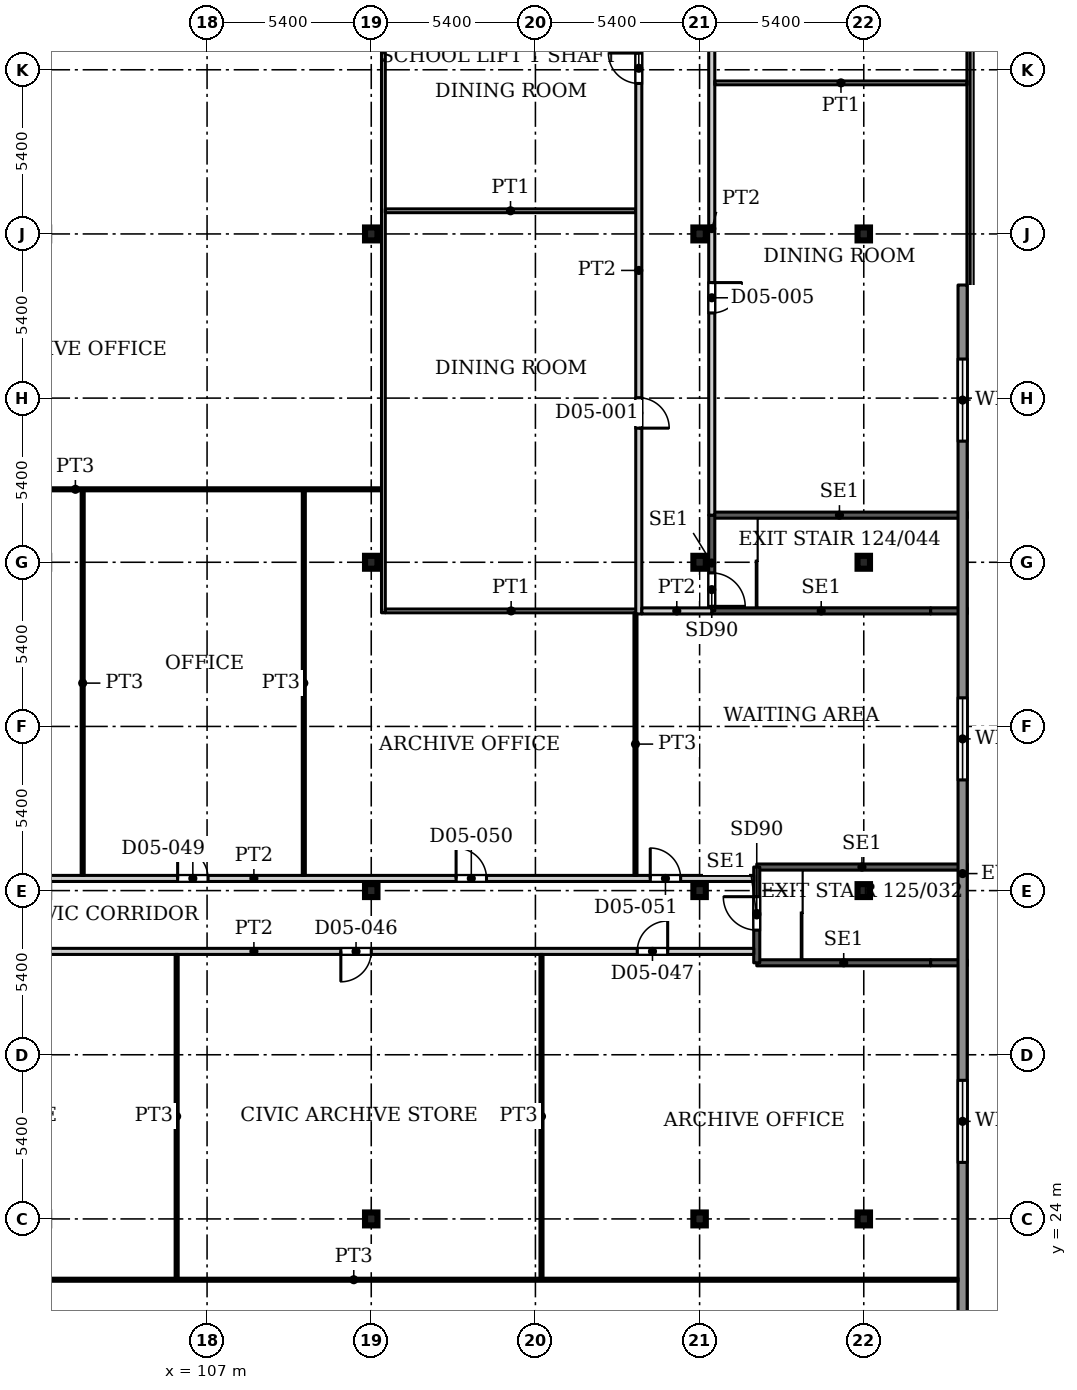
"""IFC4 building model, lengths in metres.
Left out: names, types, materials, properties, quantities, classifications, styles, units other than length and angle.
Written with IfcOpenShell. Run it as: python <this file> out.ifc"""

import sys

from ifc_helpers import new_model, si_unit, direction, frame, frame_2d, origin, origin_2d, place, context, subcontext, project, spatial, rectangle, i_section, extrude, source, transform, mapped, element, fill, save


model = new_model("IFC4")
c1 = context("Model", 3, precision=1e-05, world=origin(), true_north=direction((0.0, 1.0)))
c2 = subcontext(c1, "Body", "Model", "MODEL_VIEW")
j1 = project(units=[si_unit("LENGTHUNIT", "METRE"), si_unit("PLANEANGLEUNIT", "RADIAN")], contexts=[c1])
p1 = place(None, origin())
s1 = spatial("IfcSite", under=j1, at=p1, CompositionType="ELEMENT")
p2 = place(p1, origin())
s2 = spatial("IfcBuilding", under=s1, at=p2, CompositionType="ELEMENT")
p3 = place(p2, frame((0.0, 0.0, 26.0)))
s3 = spatial("IfcBuildingStorey", under=s2, at=p3, CompositionType="ELEMENT", Elevation=26.0)
for number, where, z_axis, x_axis in (
    (1, (112.4, 24.0, 0.0), (0.0, 0.0, 1.0), (1.0, 0.0, 0.0)),
    (2, (123.2, 24.0, 0.0), (0.0, 0.0, 1.0), (1.0, 0.0, 0.0)),
    (3, (128.6, 24.0, 0.0), (0.0, 0.0, 1.0), (1.0, 0.0, 0.0)),
    (4, (112.4, 34.8, 0.0), (0.0, 0.0, 1.0), (1.0, 0.0, 0.0)),
    (5, (123.2, 34.8, 0.0), (0.0, 0.0, 1.0), (1.0, 0.0, 0.0)),
    (6, (128.6, 34.8, 0.0), (0.0, 0.0, 1.0), (1.0, 0.0, 0.0)),
    (7, (112.4, 45.6, 0.0), (0.0, 0.0, 1.0), (1.0, 0.0, 0.0)),
    (8, (123.2, 45.6, 0.0), (0.0, 0.0, 1.0), (1.0, 0.0, 0.0)),
    (9, (128.6, 45.6, 0.0), (0.0, 0.0, 1.0), (1.0, 0.0, 0.0)),
    (10, (112.4, 56.4, 0.0), (0.0, 0.0, 1.0), (1.0, 0.0, 0.0)),
    (11, (123.2, 56.4, 0.0), (0.0, 0.0, 1.0), (1.0, 0.0, 0.0)),
    (12, (128.6, 56.4, 0.0), (0.0, 0.0, 1.0), (1.0, 0.0, 0.0)),
):
    element("IfcColumn", number, at=place(p3, frame(where, z_axis=z_axis, x_axis=x_axis)), inside=s3, PredefinedType="COLUMN", context=c2, shape_type="SweptSolid", body=[
        extrude(i_section(OverallWidth=0.409, OverallDepth=0.425, WebThickness=0.033, FlangeThickness=0.052, FilletRadius=0.013, at=origin_2d()), origin(), (0.0, 0.0, 1.0), 4.5),
    ])
p4 = place(p3, frame((131.85, 54.72, 0.0), z_axis=(0.0, 0.0, 1.0), x_axis=(0.0, -1.0, 0.0)))
e13 = element("IfcWall", 13, at=p4, inside=s3, PredefinedType="SOLIDWALL", context=c2, shape_type="SweptSolid", body=[
    extrude(rectangle(XDim=38.72, YDim=0.3, at=frame_2d((19.36, 0.0))), origin(), (0.0, 0.0, 1.0), 4.25),
])
p5 = place(p4, frame((2.435, 0.0, 2.4)))
e14 = element("IfcOpeningElement", 14, at=p5, cuts=e13, PredefinedType="OPENING", context=c2, shape_type="SweptSolid", body=[
    extrude(rectangle(XDim=2.7, YDim=1.2, at=frame_2d((1.35, 0.6))), frame((0.0, 0.16, 0.0), z_axis=(0.0, -1.0, 0.0), x_axis=(1.0, 0.0, 0.0)), (0.0, 0.0, 1.0), 0.32),
])
p6 = place(p4, frame((13.58, 0.0, 2.4)))
e15 = element("IfcOpeningElement", 15, at=p6, cuts=e13, PredefinedType="OPENING", context=c2, shape_type="SweptSolid", body=[
    extrude(rectangle(XDim=2.7, YDim=1.2, at=frame_2d((1.35, 0.6))), frame((0.0, 0.16, 0.0), z_axis=(0.0, -1.0, 0.0), x_axis=(1.0, 0.0, 0.0)), (0.0, 0.0, 1.0), 0.32),
])
p7 = place(p4, frame((26.16, 0.0, 2.4)))
e16 = element("IfcOpeningElement", 16, at=p7, cuts=e13, PredefinedType="OPENING", context=c2, shape_type="SweptSolid", body=[
    extrude(rectangle(XDim=2.7, YDim=1.2, at=frame_2d((1.35, 0.6))), frame((0.0, 0.16, 0.0), z_axis=(0.0, -1.0, 0.0), x_axis=(1.0, 0.0, 0.0)), (0.0, 0.0, 1.0), 0.32),
])
p8 = place(p3, frame((123.6, 44.0, 0.0), z_axis=(0.0, 0.0, 1.0), x_axis=(1.0, 0.0, 0.0)))
e17 = element("IfcWall", 17, at=p8, inside=s3, PredefinedType="SHEAR", context=c2, shape_type="SweptSolid", body=[
    extrude(rectangle(XDim=7.2, YDim=0.2, at=frame_2d((3.6, 0.0))), origin(), (0.0, 0.0, 1.0), 4.5),
])
p9 = place(p3, frame((130.8, 44.0, 0.0), z_axis=(0.0, 0.0, 1.0), x_axis=(1.0, 0.0, 0.0)))
e18 = element("IfcWall", 18, at=p9, inside=s3, PredefinedType="SHEAR", context=c2, shape_type="SweptSolid", body=[
    extrude(rectangle(XDim=1.2, YDim=0.2, at=frame_2d((0.6, 0.0))), origin(), (0.0, 0.0, 1.0), 4.5),
])
p10 = place(p3, frame((123.6, 47.15, 0.0), z_axis=(0.0, 0.0, 1.0), x_axis=(1.0, 0.0, 0.0)))
e19 = element("IfcWall", 19, at=p10, inside=s3, PredefinedType="SHEAR", context=c2, shape_type="SweptSolid", body=[
    extrude(rectangle(XDim=8.4, YDim=0.2, at=frame_2d((4.2, 0.0))), origin(), (0.0, 0.0, 1.0), 4.5),
])
p11 = place(p3, frame((123.6, 44.0, 0.0), z_axis=(0.0, 0.0, 1.0), x_axis=(0.0, 1.0, 0.0)))
e20 = element("IfcWall", 20, at=p11, inside=s3, PredefinedType="SHEAR", context=c2, shape_type="SweptSolid", body=[
    extrude(rectangle(XDim=3.15, YDim=0.2, at=frame_2d((1.575, 0.0))), origin(), (0.0, 0.0, 1.0), 4.5),
])
p12 = place(p11, frame((0.15, 0.0, 0.0)))
e21 = element("IfcOpeningElement", 21, at=p12, cuts=e20, PredefinedType="OPENING", context=c2, shape_type="SweptSolid", body=[
    extrude(rectangle(XDim=1.1, YDim=2.2, at=frame_2d((0.55, 1.1))), frame((0.0, 0.11, 0.0), z_axis=(0.0, -1.0, 0.0), x_axis=(1.0, 0.0, 0.0)), (0.0, 0.0, 1.0), 0.22),
])
p13 = place(p3, frame((125.08, 32.425, 0.0), z_axis=(0.0, 0.0, 1.0), x_axis=(1.0, 0.0, 0.0)))
e22 = element("IfcWall", 22, at=p13, inside=s3, PredefinedType="SHEAR", context=c2, shape_type="SweptSolid", body=[
    extrude(rectangle(XDim=5.72, YDim=0.2, at=frame_2d((2.86, 0.0))), origin(), (0.0, 0.0, 1.0), 4.5),
])
p14 = place(p3, frame((130.8, 32.425, 0.0), z_axis=(0.0, 0.0, 1.0), x_axis=(1.0, 0.0, 0.0)))
e23 = element("IfcWall", 23, at=p14, inside=s3, PredefinedType="SHEAR", context=c2, shape_type="SweptSolid", body=[
    extrude(rectangle(XDim=1.2, YDim=0.2, at=frame_2d((0.6, 0.0))), origin(), (0.0, 0.0, 1.0), 4.5),
])
p15 = place(p3, frame((125.08, 35.575, 0.0), z_axis=(0.0, 0.0, 1.0), x_axis=(1.0, 0.0, 0.0)))
e24 = element("IfcWall", 24, at=p15, inside=s3, PredefinedType="SHEAR", context=c2, shape_type="SweptSolid", body=[
    extrude(rectangle(XDim=6.92, YDim=0.2, at=frame_2d((3.46, 0.0))), origin(), (0.0, 0.0, 1.0), 4.5),
])
p16 = place(p3, frame((125.08, 32.425, 0.0), z_axis=(0.0, 0.0, 1.0), x_axis=(0.0, 1.0, 0.0)))
e25 = element("IfcWall", 25, at=p16, inside=s3, PredefinedType="SHEAR", context=c2, shape_type="SweptSolid", body=[
    extrude(rectangle(XDim=3.15, YDim=0.2, at=frame_2d((1.575, 0.0))), origin(), (0.0, 0.0, 1.0), 4.5),
])
p17 = place(p16, frame((1.075, 0.0, 0.0)))
e26 = element("IfcOpeningElement", 26, at=p17, cuts=e25, PredefinedType="OPENING", context=c2, shape_type="SweptSolid", body=[
    extrude(rectangle(XDim=1.1, YDim=2.2, at=frame_2d((0.55, 1.1))), frame((0.0, 0.11, 0.0), z_axis=(0.0, -1.0, 0.0), x_axis=(1.0, 0.0, 0.0)), (0.0, 0.0, 1.0), 0.22),
])
p18 = place(p3, frame((91.95, 22.0, 0.0), z_axis=(0.0, 0.0, 1.0), x_axis=(1.0, 0.0, 0.0)))
e27 = element("IfcWall", 27, at=p18, inside=s3, PredefinedType="PARTITIONING", context=c2, shape_type="SweptSolid", body=[
    extrude(rectangle(XDim=39.751, YDim=0.1, at=frame_2d((19.875, 0.0))), origin(), (0.0, 0.0, 1.0), 4.2),
])
p19 = place(p3, frame((92.1, 32.8, 0.0), z_axis=(0.0, 0.0, 1.0), x_axis=(1.0, 0.0, 0.0)))
e28 = element("IfcWall", 28, at=p19, inside=s3, PredefinedType="PARTITIONING", context=c2, shape_type="SweptSolid", body=[
    extrude(rectangle(XDim=32.881, YDim=0.2, at=frame_2d((16.44, 0.0))), origin(), (0.0, 0.0, 1.0), 4.2),
])
p20 = place(p19, frame((6.3, 0.0, 0.0)))
e29 = element("IfcOpeningElement", 29, at=p20, cuts=e28, PredefinedType="OPENING", context=c2, shape_type="SweptSolid", body=[
    extrude(rectangle(XDim=1.0, YDim=2.1, at=frame_2d((0.5, 1.05))), frame((0.0, 0.11, 0.0), z_axis=(0.0, -1.0, 0.0), x_axis=(1.0, 0.0, 0.0)), (0.0, 0.0, 1.0), 0.22),
])
p21 = place(p19, frame((19.3, 0.0, 0.0)))
e30 = element("IfcOpeningElement", 30, at=p21, cuts=e28, PredefinedType="OPENING", context=c2, shape_type="SweptSolid", body=[
    extrude(rectangle(XDim=1.0, YDim=2.1, at=frame_2d((0.5, 1.05))), frame((0.0, 0.11, 0.0), z_axis=(0.0, -1.0, 0.0), x_axis=(1.0, 0.0, 0.0)), (0.0, 0.0, 1.0), 0.22),
])
p22 = place(p19, frame((29.05, 0.0, 0.0)))
e31 = element("IfcOpeningElement", 31, at=p22, cuts=e28, PredefinedType="OPENING", context=c2, shape_type="SweptSolid", body=[
    extrude(rectangle(XDim=1.0, YDim=2.1, at=frame_2d((0.5, 1.05))), frame((0.0, 0.11, 0.0), z_axis=(0.0, -1.0, 0.0), x_axis=(1.0, 0.0, 0.0)), (0.0, 0.0, 1.0), 0.22),
])
p23 = place(p3, frame((92.1, 35.2, 0.0), z_axis=(0.0, 0.0, 1.0), x_axis=(1.0, 0.0, 0.0)))
e32 = element("IfcWall", 32, at=p23, inside=s3, PredefinedType="PARTITIONING", context=c2, shape_type="SweptSolid", body=[
    extrude(rectangle(XDim=32.88, YDim=0.2, at=frame_2d((16.44, 0.0))), origin(), (0.0, 0.0, 1.0), 4.2),
])
p24 = place(p23, frame((4.909, 0.0, 0.0)))
e33 = element("IfcOpeningElement", 33, at=p24, cuts=e32, PredefinedType="OPENING", context=c2, shape_type="SweptSolid", body=[
    extrude(rectangle(XDim=1.0, YDim=2.1, at=frame_2d((0.5, 1.05))), frame((0.0, 0.11, 0.0), z_axis=(0.0, -1.0, 0.0), x_axis=(1.0, 0.0, 0.0)), (0.0, 0.0, 1.0), 0.22),
])
p25 = place(p23, frame((13.932, 0.0, 0.0)))
e34 = element("IfcOpeningElement", 34, at=p25, cuts=e32, PredefinedType="OPENING", context=c2, shape_type="SweptSolid", body=[
    extrude(rectangle(XDim=1.0, YDim=2.1, at=frame_2d((0.5, 1.05))), frame((0.0, 0.11, 0.0), z_axis=(0.0, -1.0, 0.0), x_axis=(1.0, 0.0, 0.0)), (0.0, 0.0, 1.0), 0.22),
])
p26 = place(p23, frame((23.091, 0.0, 0.0)))
e35 = element("IfcOpeningElement", 35, at=p26, cuts=e32, PredefinedType="OPENING", context=c2, shape_type="SweptSolid", body=[
    extrude(rectangle(XDim=1.0, YDim=2.1, at=frame_2d((0.5, 1.05))), frame((0.0, 0.11, 0.0), z_axis=(0.0, -1.0, 0.0), x_axis=(1.0, 0.0, 0.0)), (0.0, 0.0, 1.0), 0.22),
])
p27 = place(p23, frame((29.477, 0.0, 0.0)))
e36 = element("IfcOpeningElement", 36, at=p27, cuts=e32, PredefinedType="OPENING", context=c2, shape_type="SweptSolid", body=[
    extrude(rectangle(XDim=1.0, YDim=2.1, at=frame_2d((0.5, 1.05))), frame((0.0, 0.11, 0.0), z_axis=(0.0, -1.0, 0.0), x_axis=(1.0, 0.0, 0.0)), (0.0, 0.0, 1.0), 0.22),
])
p28 = place(p3, frame((92.6, 48.0, 0.0), z_axis=(0.0, 0.0, 1.0), x_axis=(1.0, 0.0, 0.0)))
e37 = element("IfcWall", 37, at=p28, inside=s3, PredefinedType="PARTITIONING", context=c2, shape_type="SweptSolid", body=[
    extrude(rectangle(XDim=20.138, YDim=0.1, at=frame_2d((10.069, 0.0))), origin(), (0.0, 0.0, 1.0), 4.2),
])
p29 = place(p3, frame((102.909, 35.3, 0.0), z_axis=(0.0, 0.0, 1.0), x_axis=(0.0, 1.0, 0.0)))
e38 = element("IfcWall", 38, at=p29, inside=s3, PredefinedType="PARTITIONING", context=c2, shape_type="SweptSolid", body=[
    extrude(rectangle(XDim=12.65, YDim=0.1, at=frame_2d((6.325, 0.0))), origin(), (0.0, 0.0, 1.0), 4.2),
])
p30 = place(p3, frame((106.0, 22.05, 0.0), z_axis=(0.0, 0.0, 1.0), x_axis=(0.0, 1.0, 0.0)))
e39 = element("IfcWall", 39, at=p30, inside=s3, PredefinedType="PARTITIONING", context=c2, shape_type="SweptSolid", body=[
    extrude(rectangle(XDim=10.65, YDim=0.1, at=frame_2d((5.325, 0.0))), origin(), (0.0, 0.0, 1.0), 4.2),
])
p31 = place(p3, frame((110.182, 35.3, 0.0), z_axis=(0.0, 0.0, 1.0), x_axis=(0.0, 1.0, 0.0)))
e40 = element("IfcWall", 40, at=p31, inside=s3, PredefinedType="PARTITIONING", context=c2, shape_type="SweptSolid", body=[
    extrude(rectangle(XDim=12.65, YDim=0.1, at=frame_2d((6.325, 0.0))), origin(), (0.0, 0.0, 1.0), 4.2),
])
p32 = place(p3, frame((112.8, 43.938, 0.0), z_axis=(0.0, 0.0, 1.0), x_axis=(0.0, 1.0, 0.0)))
e41 = element("IfcWall", 41, at=p32, inside=s3, PredefinedType="PARTITIONING", context=c2, shape_type="SweptSolid", body=[
    extrude(rectangle(XDim=46.787, YDim=0.125, at=frame_2d((23.394, 0.0))), origin(), (0.0, 0.0, 1.0), 4.2),
])
p33 = place(p3, frame((112.862, 44.0, 0.0), z_axis=(0.0, 0.0, 1.0), x_axis=(1.0, 0.0, 0.0)))
e42 = element("IfcWall", 42, at=p33, inside=s3, PredefinedType="PARTITIONING", context=c2, shape_type="SweptSolid", body=[
    extrude(rectangle(XDim=8.279, YDim=0.125, at=frame_2d((4.14, 0.0))), origin(), (0.0, 0.0, 1.0), 4.2),
])
p34 = place(p3, frame((112.862, 57.162, 0.0), z_axis=(0.0, 0.0, 1.0), x_axis=(1.0, 0.0, 0.0)))
e43 = element("IfcWall", 43, at=p34, inside=s3, PredefinedType="PARTITIONING", context=c2, shape_type="SweptSolid", body=[
    extrude(rectangle(XDim=8.238, YDim=0.125, at=frame_2d((4.119, 0.0))), origin(), (0.0, 0.0, 1.0), 4.2),
])
p35 = place(p3, frame((118.0, 22.05, 0.0), z_axis=(0.0, 0.0, 1.0), x_axis=(0.0, 1.0, 0.0)))
e44 = element("IfcWall", 44, at=p35, inside=s3, PredefinedType="PARTITIONING", context=c2, shape_type="SweptSolid", body=[
    extrude(rectangle(XDim=10.65, YDim=0.1, at=frame_2d((5.325, 0.0))), origin(), (0.0, 0.0, 1.0), 4.2),
])
p36 = place(p3, frame((121.091, 35.3, 0.0), z_axis=(0.0, 0.0, 1.0), x_axis=(0.0, 1.0, 0.0)))
e45 = element("IfcWall", 45, at=p36, inside=s3, PredefinedType="PARTITIONING", context=c2, shape_type="SweptSolid", body=[
    extrude(rectangle(XDim=8.638, YDim=0.1, at=frame_2d((4.319, 0.0))), origin(), (0.0, 0.0, 1.0), 4.2),
])
p37 = place(p3, frame((121.2, 43.9, 0.0), z_axis=(0.0, 0.0, 1.0), x_axis=(0.0, 1.0, 0.0)))
e46 = element("IfcWall", 46, at=p37, inside=s3, PredefinedType="PARTITIONING", context=c2, shape_type="SweptSolid", body=[
    extrude(rectangle(XDim=22.6, YDim=0.2, at=frame_2d((11.3, 0.0))), origin(), (0.0, 0.0, 1.0), 4.2),
])
p38 = place(p37, frame((6.112, 0.0, 0.0)))
e47 = element("IfcOpeningElement", 47, at=p38, cuts=e46, PredefinedType="OPENING", context=c2, shape_type="SweptSolid", body=[
    extrude(rectangle(XDim=1.0, YDim=2.1, at=frame_2d((0.5, 1.05))), frame((0.0, 0.11, 0.0), z_axis=(0.0, -1.0, 0.0), x_axis=(1.0, 0.0, 0.0)), (0.0, 0.0, 1.0), 0.22),
])
p39 = place(p37, frame((17.45, 0.0, 0.0)))
e48 = element("IfcOpeningElement", 48, at=p39, cuts=e46, PredefinedType="OPENING", context=c2, shape_type="SweptSolid", body=[
    extrude(rectangle(XDim=1.0, YDim=2.1, at=frame_2d((0.5, 1.05))), frame((0.0, 0.11, 0.0), z_axis=(0.0, -1.0, 0.0), x_axis=(1.0, 0.0, 0.0)), (0.0, 0.0, 1.0), 0.22),
])
p40 = place(p3, frame((121.3, 44.0, 0.0), z_axis=(0.0, 0.0, 1.0), x_axis=(1.0, 0.0, 0.0)))
e49 = element("IfcWall", 49, at=p40, inside=s3, PredefinedType="PARTITIONING", context=c2, shape_type="SweptSolid", body=[
    extrude(rectangle(XDim=2.3, YDim=0.2, at=frame_2d((1.15, 0.0))), origin(), (0.0, 0.0, 1.0), 4.2),
])
p41 = place(p3, frame((123.6, 47.15, 0.0), z_axis=(0.0, 0.0, 1.0), x_axis=(0.0, 1.0, 0.0)))
e50 = element("IfcWall", 50, at=p41, inside=s3, PredefinedType="PARTITIONING", context=c2, shape_type="SweptSolid", body=[
    extrude(rectangle(XDim=18.85, YDim=0.2, at=frame_2d((9.425, 0.0))), origin(), (0.0, 0.0, 1.0), 4.2),
])
p42 = place(p41, frame((6.65, 0.0, 0.0)))
e51 = element("IfcOpeningElement", 51, at=p42, cuts=e50, PredefinedType="OPENING", context=c2, shape_type="SweptSolid", body=[
    extrude(rectangle(XDim=1.0, YDim=2.1, at=frame_2d((0.5, 1.05))), frame((0.0, 0.11, 0.0), z_axis=(0.0, -1.0, 0.0), x_axis=(1.0, 0.0, 0.0)), (0.0, 0.0, 1.0), 0.22),
])
p43 = place(p41, frame((16.119, 0.0, 0.0)))
e52 = element("IfcOpeningElement", 52, at=p43, cuts=e50, PredefinedType="OPENING", context=c2, shape_type="SweptSolid", body=[
    extrude(rectangle(XDim=1.0, YDim=2.1, at=frame_2d((0.5, 1.05))), frame((0.0, 0.11, 0.0), z_axis=(0.0, -1.0, 0.0), x_axis=(1.0, 0.0, 0.0)), (0.0, 0.0, 1.0), 0.22),
])
p44 = place(p3, frame((123.7, 61.369, 0.0), z_axis=(0.0, 0.0, 1.0), x_axis=(1.0, 0.0, 0.0)))
e53 = element("IfcWall", 53, at=p44, inside=s3, PredefinedType="PARTITIONING", context=c2, shape_type="SweptSolid", body=[
    extrude(rectangle(XDim=8.3, YDim=0.125, at=frame_2d((4.15, 0.0))), origin(), (0.0, 0.0, 1.0), 4.2),
])
m1 = source(origin(), c2, "Body", "SweptSolid", [
    extrude(rectangle(XDim=2.7, YDim=1.2, at=frame_2d((1.35, 0.6))), frame((0.0, 0.03, 0.0), z_axis=(0.0, -1.0, 0.0), x_axis=(1.0, 0.0, 0.0)), (0.0, 0.0, 1.0), 0.06),
])
p45 = place(p5, origin())
e54 = element("IfcWindow", 54, at=p45, inside=s3, PartitioningType="SINGLE_PANEL", PredefinedType="WINDOW", context=c2, shape_type="MappedRepresentation", body=[
    mapped(m1, transform((0.0, 0.0, 0.0), x_axis=(1.0, 0.0, 0.0), y_axis=(0.0, 1.0, 0.0), z_axis=(0.0, 0.0, 1.0), scale=1.0)),
])
fill(e14, e54)
p46 = place(p6, origin())
e55 = element("IfcWindow", 55, at=p46, inside=s3, PartitioningType="SINGLE_PANEL", PredefinedType="WINDOW", context=c2, shape_type="MappedRepresentation", body=[
    mapped(m1, transform((0.0, 0.0, 0.0), x_axis=(1.0, 0.0, 0.0), y_axis=(0.0, 1.0, 0.0), z_axis=(0.0, 0.0, 1.0), scale=1.0)),
])
fill(e15, e55)
p47 = place(p7, origin())
e56 = element("IfcWindow", 56, at=p47, inside=s3, PartitioningType="SINGLE_PANEL", PredefinedType="WINDOW", context=c2, shape_type="MappedRepresentation", body=[
    mapped(m1, transform((0.0, 0.0, 0.0), x_axis=(1.0, 0.0, 0.0), y_axis=(0.0, 1.0, 0.0), z_axis=(0.0, 0.0, 1.0), scale=1.0)),
])
fill(e16, e56)
m2 = source(origin(), c2, "Body", "SweptSolid", [
    extrude(rectangle(XDim=1.1, YDim=2.2, at=frame_2d((0.55, 1.1))), frame((0.0, 0.025, 0.0), z_axis=(0.0, -1.0, 0.0), x_axis=(1.0, 0.0, 0.0)), (0.0, 0.0, 1.0), 0.05),
])
p48 = place(p12, origin())
e57 = element("IfcDoor", 57, at=p48, inside=s3, OperationType="SINGLE_SWING_RIGHT", PredefinedType="DOOR", context=c2, shape_type="MappedRepresentation", body=[
    mapped(m2, transform((0.0, 0.0, 0.0), x_axis=(1.0, 0.0, 0.0), y_axis=(0.0, 1.0, 0.0), z_axis=(0.0, 0.0, 1.0), scale=1.0)),
])
fill(e21, e57)
p49 = place(p17, origin())
e58 = element("IfcDoor", 58, at=p49, inside=s3, OperationType="SINGLE_SWING_LEFT", PredefinedType="DOOR", context=c2, shape_type="MappedRepresentation", body=[
    mapped(m2, transform((0.0, 0.0, 0.0), x_axis=(1.0, 0.0, 0.0), y_axis=(0.0, 1.0, 0.0), z_axis=(0.0, 0.0, 1.0), scale=1.0)),
])
fill(e26, e58)
m3 = source(origin(), c2, "Body", "SweptSolid", [
    extrude(rectangle(XDim=1.0, YDim=2.1, at=frame_2d((0.5, 1.05))), frame((0.0, 0.025, 0.0), z_axis=(0.0, -1.0, 0.0), x_axis=(1.0, 0.0, 0.0)), (0.0, 0.0, 1.0), 0.05),
])
p50 = place(p38, origin())
e59 = element("IfcDoor", 59, at=p50, inside=s3, OperationType="SINGLE_SWING_RIGHT", PredefinedType="DOOR", context=c2, shape_type="MappedRepresentation", body=[
    mapped(m3, transform((0.0, 0.0, 0.0), x_axis=(1.0, 0.0, 0.0), y_axis=(0.0, 1.0, 0.0), z_axis=(0.0, 0.0, 1.0), scale=1.0)),
])
fill(e47, e59)
p51 = place(p39, origin())
e60 = element("IfcDoor", 60, at=p51, inside=s3, OperationType="SINGLE_SWING_LEFT", PredefinedType="DOOR", context=c2, shape_type="MappedRepresentation", body=[
    mapped(m3, transform((0.0, 0.0, 0.0), x_axis=(1.0, 0.0, 0.0), y_axis=(0.0, 1.0, 0.0), z_axis=(0.0, 0.0, 1.0), scale=1.0)),
])
fill(e48, e60)
p52 = place(p42, origin())
e61 = element("IfcDoor", 61, at=p52, inside=s3, OperationType="SINGLE_SWING_RIGHT", PredefinedType="DOOR", context=c2, shape_type="MappedRepresentation", body=[
    mapped(m3, transform((0.0, 0.0, 0.0), x_axis=(1.0, 0.0, 0.0), y_axis=(0.0, 1.0, 0.0), z_axis=(0.0, 0.0, 1.0), scale=1.0)),
])
fill(e51, e61)
p53 = place(p21, origin())
e62 = element("IfcDoor", 62, at=p53, inside=s3, OperationType="SINGLE_SWING_RIGHT", PredefinedType="DOOR", context=c2, shape_type="MappedRepresentation", body=[
    mapped(m3, transform((0.0, 0.0, 0.0), x_axis=(1.0, 0.0, 0.0), y_axis=(0.0, 1.0, 0.0), z_axis=(0.0, 0.0, 1.0), scale=1.0)),
])
fill(e30, e62)
p54 = place(p22, origin())
e63 = element("IfcDoor", 63, at=p54, inside=s3, OperationType="SINGLE_SWING_LEFT", PredefinedType="DOOR", context=c2, shape_type="MappedRepresentation", body=[
    mapped(m3, transform((0.0, 0.0, 0.0), x_axis=(1.0, 0.0, 0.0), y_axis=(0.0, 1.0, 0.0), z_axis=(0.0, 0.0, 1.0), scale=1.0)),
])
fill(e31, e63)
p55 = place(p25, origin())
e64 = element("IfcDoor", 64, at=p55, inside=s3, OperationType="SINGLE_SWING_LEFT", PredefinedType="DOOR", context=c2, shape_type="MappedRepresentation", body=[
    mapped(m3, transform((0.0, 0.0, 0.0), x_axis=(1.0, 0.0, 0.0), y_axis=(0.0, 1.0, 0.0), z_axis=(0.0, 0.0, 1.0), scale=1.0)),
])
fill(e34, e64)
p56 = place(p26, origin())
e65 = element("IfcDoor", 65, at=p56, inside=s3, OperationType="SINGLE_SWING_LEFT", PredefinedType="DOOR", context=c2, shape_type="MappedRepresentation", body=[
    mapped(m3, transform((0.0, 0.0, 0.0), x_axis=(1.0, 0.0, 0.0), y_axis=(0.0, 1.0, 0.0), z_axis=(0.0, 0.0, 1.0), scale=1.0)),
])
fill(e35, e65)
p57 = place(p27, origin())
e66 = element("IfcDoor", 66, at=p57, inside=s3, OperationType="SINGLE_SWING_LEFT", PredefinedType="DOOR", context=c2, shape_type="MappedRepresentation", body=[
    mapped(m3, transform((0.0, 0.0, 0.0), x_axis=(1.0, 0.0, 0.0), y_axis=(0.0, 1.0, 0.0), z_axis=(0.0, 0.0, 1.0), scale=1.0)),
])
fill(e36, e66)
save(model, sys.argv[1])
